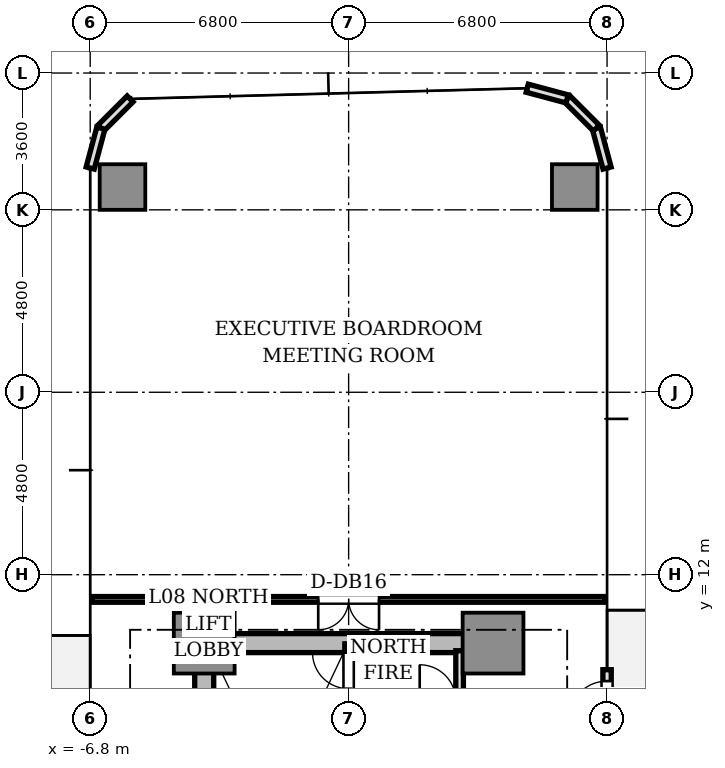
"""IFC4 building model, lengths in metres.
Left out: names, types, materials, properties, quantities, classifications, styles, units other than length and angle.
Written with IfcOpenShell. Run it as: python <this file> out.ifc"""

import sys

from ifc_helpers import new_model, si_unit, direction, frame, frame_2d, origin, origin_2d, place, context, subcontext, project, spatial, rectangle, extrude, source, transform, mapped, element, fill, save


model = new_model("IFC4")
c1 = context("Model", 3, precision=1e-05, world=origin(), true_north=direction((0.0, 1.0)))
c2 = subcontext(c1, "Body", "Model", "MODEL_VIEW")
j1 = project(units=[si_unit("LENGTHUNIT", "METRE"), si_unit("PLANEANGLEUNIT", "RADIAN")], contexts=[c1])
p1 = place(None, origin())
s1 = spatial("IfcSite", under=j1, at=p1, CompositionType="ELEMENT")
p2 = place(p1, origin())
s2 = spatial("IfcBuilding", under=s1, at=p2, CompositionType="ELEMENT")
p3 = place(p2, frame((0.0, 0.0, 33.15)))
s3 = spatial("IfcBuildingStorey", under=s2, at=p3, CompositionType="ELEMENT", Elevation=33.15)
p4 = place(p3, frame((-3.55, 10.2, 0.0), z_axis=(0.0, 0.0, 1.0), x_axis=(1.0, 0.0, 0.0)))
e1 = element("IfcWall", 1, at=p4, inside=s3, PredefinedType="SHEAR", context=c2, shape_type="SweptSolid", body=[
    extrude(rectangle(XDim=7.1, YDim=0.5, at=frame_2d((3.55, 0.0))), origin(), (0.0, 0.0, 1.0), 3.11),
])
p5 = place(p3, frame((-3.8, 2.85, 0.0), z_axis=(0.0, 0.0, 1.0), x_axis=(0.0, 1.0, 0.0)))
e2 = element("IfcWall", 2, at=p5, inside=s3, PredefinedType="SHEAR", context=c2, shape_type="SweptSolid", body=[
    extrude(rectangle(XDim=6.9, YDim=0.5, at=frame_2d((3.45, 0.0))), origin(), (0.0, 0.0, 1.0), 3.11),
])
m1 = source(origin(), c2, "Body", "SweptSolid", [
    extrude(rectangle(XDim=1.6, YDim=1.6, at=origin_2d()), origin(), (0.0, 0.0, 1.0), 3.11),
])
for number, where, z_axis, x_axis in (
    (3, (-3.8, 10.2, 0.0), (0.0, 0.0, 1.0), (1.0, 0.0, 0.0)),
    (4, (3.8, 10.2, 0.0), (0.0, 0.0, 1.0), (1.0, 0.0, 0.0)),
):
    element("IfcColumn", number, at=place(p3, frame(where, z_axis=z_axis, x_axis=x_axis)), inside=s3, PredefinedType="COLUMN", context=c2, shape_type="MappedRepresentation", body=[
        mapped(m1, transform((0.0, 0.0, 0.0), scale=1.0)),
    ])
m2 = source(origin(), c2, "Body", "SweptSolid", [
    extrude(rectangle(XDim=1.2, YDim=1.2, at=origin_2d()), origin(), (0.0, 0.0, 1.0), 3.11),
])
for number, where, z_axis, x_axis in (
    (5, (5.95, 22.2, 0.0), (0.0, 0.0, 1.0), (1.0, 0.0, 0.0)),
    (6, (-5.95, 22.2, 0.0), (0.0, 0.0, 1.0), (1.0, 0.0, 0.0)),
):
    element("IfcColumn", number, at=place(p3, frame(where, z_axis=z_axis, x_axis=x_axis)), inside=s3, PredefinedType="COLUMN", context=c2, shape_type="MappedRepresentation", body=[
        mapped(m2, transform((0.0, 0.0, 0.0), scale=1.0)),
    ])
p6 = place(p3, frame((6.8, 6.8, 0.0), z_axis=(0.0, 0.0, 1.0), x_axis=(0.0, 1.0, 0.0)))
e7 = element("IfcWall", 7, at=p6, inside=s3, PredefinedType="STANDARD", context=c2, shape_type="SweptSolid", body=[
    extrude(rectangle(XDim=2.7, YDim=0.22, at=frame_2d((1.35, 0.0))), origin(), (0.0, 0.0, 1.0), 3.11),
])
p7 = place(p6, frame((1.4, 0.0, 0.0)))
e8 = element("IfcOpeningElement", 8, at=p7, cuts=e7, PredefinedType="OPENING", context=c2, shape_type="SweptSolid", body=[
    extrude(rectangle(XDim=1.0, YDim=2.2, at=frame_2d((0.5, 1.1))), frame((0.0, 0.12, 0.0), z_axis=(0.0, -1.0, 0.0), x_axis=(1.0, 0.0, 0.0)), (0.0, 0.0, 1.0), 0.24),
])
for number, where, z_axis, x_axis in (
    (9, (6.8, 22.7, 0.0), (0.0, 0.0, 1.0), (-0.259, 0.966, 0.0)),
    (10, (6.519, 23.75, 0.0), (0.0, 0.0, 1.0), (-0.707, 0.707, 0.0)),
    (11, (5.75, 24.519, 0.0), (0.0, 0.0, 1.0), (-0.966, 0.259, 0.0)),
    (12, (-5.75, 24.519, 0.0), (0.0, 0.0, 1.0), (-0.707, -0.707, 0.0)),
    (13, (-6.519, 23.75, 0.0), (0.0, 0.0, 1.0), (-0.259, -0.966, 0.0)),
):
    element("IfcWall", number, at=place(p3, frame(where, z_axis=z_axis, x_axis=x_axis)), inside=s3, PredefinedType="STANDARD", context=c2, shape_type="SweptSolid", body=[
        extrude(rectangle(XDim=1.087, YDim=0.22, at=frame_2d((0.543, 0.0))), origin(), (0.0, 0.0, 1.0), 3.11),
    ])
p8 = place(p3, frame((0.0, 2.5, 0.0), z_axis=(0.0, 0.0, 1.0), x_axis=(0.0, 1.0, 0.0)))
e14 = element("IfcWall", 14, at=p8, inside=s3, PredefinedType="SOLIDWALL", context=c2, shape_type="SweptSolid", body=[
    extrude(rectangle(XDim=7.68, YDim=0.2, at=frame_2d((3.84, 0.0))), origin(), (0.0, 0.0, 1.0), 3.11),
])
p9 = place(p8, frame((6.5, 0.0, 0.0)))
e15 = element("IfcOpeningElement", 15, at=p9, cuts=e14, PredefinedType="OPENING", context=c2, shape_type="SweptSolid", body=[
    extrude(rectangle(XDim=0.95, YDim=2.15, at=frame_2d((0.475, 1.075))), frame((0.0, 0.11, 0.0), z_axis=(0.0, -1.0, 0.0), x_axis=(1.0, 0.0, 0.0)), (0.0, 0.0, 1.0), 0.22),
])
p10 = place(p3, frame((2.92, 8.68, 0.0), z_axis=(0.0, 0.0, 1.0), x_axis=(0.0, 1.0, 0.0)))
e16 = element("IfcWall", 16, at=p10, inside=s3, PredefinedType="SOLIDWALL", context=c2, shape_type="SweptSolid", body=[
    extrude(rectangle(XDim=1.32, YDim=0.2, at=frame_2d((0.66, 0.0))), origin(), (0.0, 0.0, 1.0), 2.66),
])
p11 = place(p3, frame((6.75, 11.35, 0.0), z_axis=(0.0, 0.0, 1.0), x_axis=(-1.0, 0.0, 0.0)))
e17 = element("IfcWall", 17, at=p11, inside=s3, PredefinedType="PARTITIONING", context=c2, shape_type="SweptSolid", body=[
    extrude(rectangle(XDim=13.5, YDim=0.15, at=frame_2d((6.75, 0.0))), origin(), (0.0, 0.0, 1.0), 2.66),
])
p12 = place(p11, frame((5.95, 0.0, 0.0)))
e18 = element("IfcOpeningElement", 18, at=p12, cuts=e17, PredefinedType="OPENING", context=c2, shape_type="SweptSolid", body=[
    extrude(rectangle(XDim=1.6, YDim=2.25, at=frame_2d((0.8, 1.125))), frame((0.0, 0.085, 0.0), z_axis=(0.0, -1.0, 0.0), x_axis=(1.0, 0.0, 0.0)), (0.0, 0.0, 1.0), 0.17),
])
m3 = source(origin(), c2, "Body", "SweptSolid", [
    extrude(rectangle(XDim=1.0, YDim=0.05, at=origin_2d()), origin(), (0.0, 0.0, 1.0), 2.2),
])
p13 = place(p7, frame((0.5, 0.0, 0.0)))
e19 = element("IfcDoor", 19, at=p13, inside=s3, OperationType="SINGLE_SWING_LEFT", PredefinedType="DOOR", context=c2, shape_type="MappedRepresentation", body=[
    mapped(m3, transform((0.0, 0.0, 0.0), scale=1.0)),
])
fill(e8, e19)
m4 = source(origin(), c2, "Body", "SweptSolid", [
    extrude(rectangle(XDim=0.95, YDim=0.05, at=origin_2d()), origin(), (0.0, 0.0, 1.0), 2.15),
])
p14 = place(p9, frame((0.475, 0.0, 0.0)))
e20 = element("IfcDoor", 20, at=p14, inside=s3, OperationType="SINGLE_SWING_RIGHT", PredefinedType="DOOR", context=c2, shape_type="MappedRepresentation", body=[
    mapped(m4, transform((0.0, 0.0, 0.0), scale=1.0)),
])
fill(e15, e20)
m5 = source(origin(), c2, "Body", "SweptSolid", [
    extrude(rectangle(XDim=1.6, YDim=0.05, at=origin_2d()), origin(), (0.0, 0.0, 1.0), 2.25),
])
p15 = place(p12, frame((0.8, 0.0, 0.0)))
e21 = element("IfcDoor", 21, at=p15, inside=s3, OperationType="DOUBLE_DOOR_SINGLE_SWING", PredefinedType="DOOR", context=c2, shape_type="MappedRepresentation", body=[
    mapped(m5, transform((0.0, 0.0, 0.0), scale=1.0)),
])
fill(e18, e21)
save(model, sys.argv[1])
